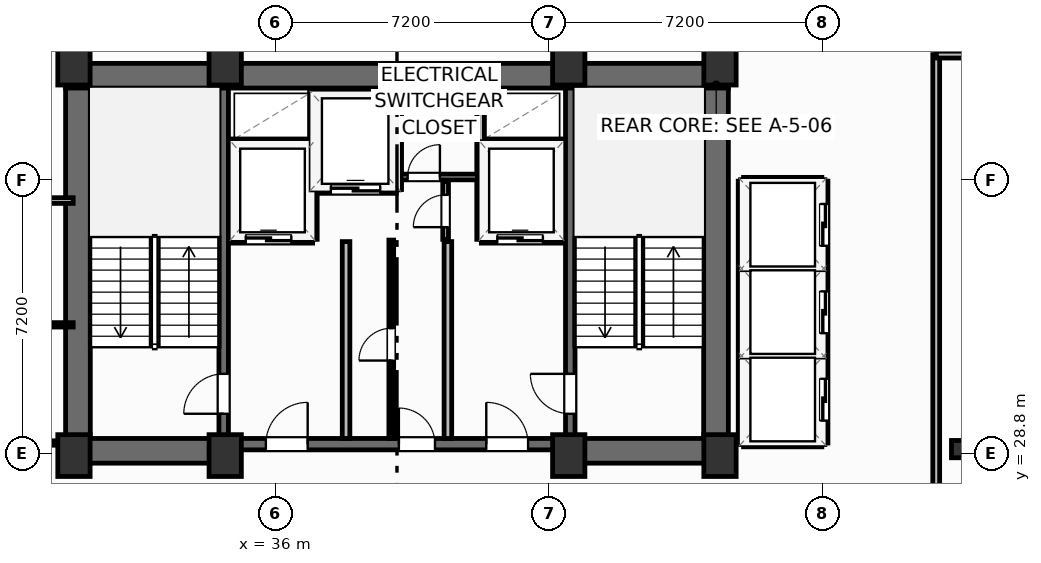
"""IFC4 building model, lengths in metres.
Left out: names, types, materials, properties, quantities, classifications, styles, units other than length and angle.
Written with IfcOpenShell. Run it as: python <this file> out.ifc"""

import sys

from ifc_helpers import new_model, si_unit, direction, frame, frame_2d, origin, origin_2d, place, context, subcontext, project, spatial, rectangle, i_section, extrude, element, fill, save


model = new_model("IFC4")
c1 = context("Model", 3, precision=1e-05, world=origin(), true_north=direction((0.0, 1.0)))
c2 = subcontext(c1, "Body", "Model", "MODEL_VIEW")
j1 = project(units=[si_unit("LENGTHUNIT", "METRE"), si_unit("PLANEANGLEUNIT", "RADIAN")], contexts=[c1])
p1 = place(None, origin())
s1 = spatial("IfcSite", under=j1, at=p1, CompositionType="ELEMENT")
p2 = place(p1, origin())
s2 = spatial("IfcBuilding", under=s1, at=p2, CompositionType="ELEMENT")
p3 = place(p2, frame((0.0, 0.0, 204.2)))
s3 = spatial("IfcBuildingStorey", under=s2, at=p3, CompositionType="ELEMENT", Elevation=204.2)
for number, where, z_axis, x_axis in (
    (1, (30.7, 28.75, 0.0), (0.0, 0.0, 1.0), (1.0, 0.0, 0.0)),
    (2, (34.68, 28.75, 0.0), (0.0, 0.0, 1.0), (1.0, 0.0, 0.0)),
    (3, (43.72, 28.75, 0.0), (0.0, 0.0, 1.0), (1.0, 0.0, 0.0)),
    (4, (47.7, 28.75, 0.0), (0.0, 0.0, 1.0), (1.0, 0.0, 0.0)),
    (5, (30.7, 39.05, 0.0), (0.0, 0.0, 1.0), (1.0, 0.0, 0.0)),
    (6, (34.68, 39.05, 0.0), (0.0, 0.0, 1.0), (1.0, 0.0, 0.0)),
    (7, (43.72, 39.05, 0.0), (0.0, 0.0, 1.0), (1.0, 0.0, 0.0)),
    (8, (47.7, 39.05, 0.0), (0.0, 0.0, 1.0), (1.0, 0.0, 0.0)),
):
    element("IfcColumn", number, at=place(p3, frame(where, z_axis=z_axis, x_axis=x_axis)), inside=s3, PredefinedType="COLUMN", context=c2, shape_type="SweptSolid", body=[
        extrude(rectangle(XDim=0.85, YDim=1.1, at=origin_2d()), origin(), (0.0, 0.0, 1.0), 3.7),
    ])
p4 = place(p3, frame((54.0, 28.92, 0.0), z_axis=(0.0, 0.0, 1.0), x_axis=(1.0, 0.0, 0.0)))
e9 = element("IfcColumn", 9, at=p4, inside=s3, PredefinedType="COLUMN", context=c2, shape_type="SweptSolid", body=[
    extrude(i_section(OverallWidth=0.418, OverallDepth=0.455, WebThickness=0.042, FlangeThickness=0.068, FilletRadius=0.025, at=origin_2d()), origin(), (0.0, 0.0, 1.0), 3.7),
])
p5 = place(p3, frame((30.48, 38.745, 0.0), z_axis=(0.0, 0.0, 1.0), x_axis=(1.0, 0.0, 0.0)))
e10 = element("IfcWall", 10, at=p5, inside=s3, PredefinedType="SHEAR", context=c2, shape_type="SweptSolid", body=[
    extrude(rectangle(XDim=17.44, YDim=0.65, at=frame_2d((8.72, 0.0))), origin(), (0.0, 0.0, 1.0), 3.38),
])
for number, where, z_axis, x_axis in (
    (11, (30.805, 29.2, 0.0), (0.0, 0.0, 1.0), (0.0, 1.0, 0.0)),
    (12, (47.595, 29.2, 0.0), (0.0, 0.0, 1.0), (0.0, 1.0, 0.0)),
):
    element("IfcWall", number, at=place(p3, frame(where, z_axis=z_axis, x_axis=x_axis)), inside=s3, PredefinedType="SHEAR", context=c2, shape_type="SweptSolid", body=[
        extrude(rectangle(XDim=9.22, YDim=0.65, at=frame_2d((4.61, 0.0))), origin(), (0.0, 0.0, 1.0), 3.38),
    ])
p6 = place(p3, frame((30.48, 28.875, 0.0), z_axis=(0.0, 0.0, 1.0), x_axis=(1.0, 0.0, 0.0)))
e13 = element("IfcWall", 13, at=p6, inside=s3, PredefinedType="SHEAR", context=c2, shape_type="SweptSolid", body=[
    extrude(rectangle(XDim=4.32, YDim=0.65, at=frame_2d((2.16, 0.0))), origin(), (0.0, 0.0, 1.0), 3.38),
])
p7 = place(p3, frame((43.6, 28.875, 0.0), z_axis=(0.0, 0.0, 1.0), x_axis=(1.0, 0.0, 0.0)))
e14 = element("IfcWall", 14, at=p7, inside=s3, PredefinedType="SHEAR", context=c2, shape_type="SweptSolid", body=[
    extrude(rectangle(XDim=4.32, YDim=0.65, at=frame_2d((2.16, 0.0))), origin(), (0.0, 0.0, 1.0), 3.38),
])
p8 = place(p3, frame((34.8, 29.05, 0.0), z_axis=(0.0, 0.0, 1.0), x_axis=(1.0, 0.0, 0.0)))
e15 = element("IfcWall", 15, at=p8, inside=s3, PredefinedType="SHEAR", context=c2, shape_type="SweptSolid", body=[
    extrude(rectangle(XDim=8.8, YDim=0.3, at=frame_2d((4.4, 0.0))), origin(), (0.0, 0.0, 1.0), 3.38),
])
p9 = place(p8, frame((0.95, 0.0, 0.0)))
e16 = element("IfcOpeningElement", 16, at=p9, cuts=e15, PredefinedType="OPENING", context=c2, shape_type="SweptSolid", body=[
    extrude(rectangle(XDim=1.1, YDim=2.15, at=frame_2d((0.55, 1.075))), frame((0.0, 0.16, 0.0), z_axis=(0.0, -1.0, 0.0), x_axis=(1.0, 0.0, 0.0)), (0.0, 0.0, 1.0), 0.32),
])
p10 = place(p8, frame((6.75, 0.0, 0.0)))
e17 = element("IfcOpeningElement", 17, at=p10, cuts=e15, PredefinedType="OPENING", context=c2, shape_type="SweptSolid", body=[
    extrude(rectangle(XDim=1.1, YDim=2.15, at=frame_2d((0.55, 1.075))), frame((0.0, 0.16, 0.0), z_axis=(0.0, -1.0, 0.0), x_axis=(1.0, 0.0, 0.0)), (0.0, 0.0, 1.0), 0.32),
])
p11 = place(p8, frame((4.45, 0.0, 0.0)))
e18 = element("IfcOpeningElement", 18, at=p11, cuts=e15, PredefinedType="OPENING", context=c2, shape_type="SweptSolid", body=[
    extrude(rectangle(XDim=0.95, YDim=2.15, at=frame_2d((0.475, 1.075))), frame((0.0, 0.16, 0.0), z_axis=(0.0, -1.0, 0.0), x_axis=(1.0, 0.0, 0.0)), (0.0, 0.0, 1.0), 0.32),
])
p12 = place(p3, frame((34.64, 29.2, 0.0), z_axis=(0.0, 0.0, 1.0), x_axis=(0.0, 1.0, 0.0)))
e19 = element("IfcWall", 19, at=p12, inside=s3, PredefinedType="SHEAR", context=c2, shape_type="SweptSolid", body=[
    extrude(rectangle(XDim=9.22, YDim=0.25, at=frame_2d((4.61, 0.0))), origin(), (0.0, 0.0, 1.0), 3.38),
])
p13 = place(p12, frame((0.65, 0.0, 0.0)))
e20 = element("IfcOpeningElement", 20, at=p13, cuts=e19, PredefinedType="OPENING", context=c2, shape_type="SweptSolid", body=[
    extrude(rectangle(XDim=1.05, YDim=2.15, at=frame_2d((0.525, 1.075))), frame((0.0, 0.135, 0.0), z_axis=(0.0, -1.0, 0.0), x_axis=(1.0, 0.0, 0.0)), (0.0, 0.0, 1.0), 0.27),
])
p14 = place(p3, frame((43.76, 29.2, 0.0), z_axis=(0.0, 0.0, 1.0), x_axis=(0.0, 1.0, 0.0)))
e21 = element("IfcWall", 21, at=p14, inside=s3, PredefinedType="SHEAR", context=c2, shape_type="SweptSolid", body=[
    extrude(rectangle(XDim=9.22, YDim=0.25, at=frame_2d((4.61, 0.0))), origin(), (0.0, 0.0, 1.0), 3.38),
])
p15 = place(p14, frame((0.65, 0.0, 0.0)))
e22 = element("IfcOpeningElement", 22, at=p15, cuts=e21, PredefinedType="OPENING", context=c2, shape_type="SweptSolid", body=[
    extrude(rectangle(XDim=1.05, YDim=2.15, at=frame_2d((0.525, 1.075))), frame((0.0, 0.135, 0.0), z_axis=(0.0, -1.0, 0.0), x_axis=(1.0, 0.0, 0.0)), (0.0, 0.0, 1.0), 0.27),
])
p16 = place(p3, frame((53.45, 39.3, 0.0), z_axis=(0.0, 0.0, 1.0), x_axis=(0.0, 1.0, 0.0)))
e23 = element("IfcWall", 23, at=p16, inside=s3, PredefinedType="PARTITIONING", context=c2, shape_type="SweptSolid", body=[
    extrude(rectangle(XDim=2.31, YDim=0.125, at=frame_2d((1.155, 0.0))), origin(), (0.0, 0.0, 1.0), 3.38),
])
p17 = place(p3, frame((53.39, 19.24, 0.0), z_axis=(0.0, 0.0, 1.0), x_axis=(0.0, 1.0, 0.0)))
e24 = element("IfcWall", 24, at=p17, inside=s3, PredefinedType="PARTITIONING", context=c2, shape_type="SweptSolid", body=[
    extrude(rectangle(XDim=20.06, YDim=0.18, at=frame_2d((10.03, 0.0))), origin(), (0.0, 0.0, 1.0), 3.38),
])
p18 = place(p17, frame((7.7, 0.0, 0.0)))
e25 = element("IfcOpeningElement", 25, at=p18, cuts=e24, PredefinedType="OPENING", context=c2, shape_type="SweptSolid", body=[
    extrude(rectangle(XDim=0.95, YDim=2.05, at=frame_2d((0.475, 1.025))), frame((0.0, 0.1, 0.0), z_axis=(0.0, -1.0, 0.0), x_axis=(1.0, 0.0, 0.0)), (0.0, 0.0, 1.0), 0.2),
])
p19 = place(p3, frame((53.39, 39.3, 0.0), z_axis=(0.0, 0.0, 1.0), x_axis=(1.0, 0.0, 0.0)))
e26 = element("IfcWall", 26, at=p19, inside=s3, PredefinedType="PARTITIONING", context=c2, shape_type="SweptSolid", body=[
    extrude(rectangle(XDim=19.49, YDim=0.18, at=frame_2d((9.745, 0.0))), origin(), (0.0, 0.0, 1.0), 3.38),
])
for number, where, z_axis, x_axis in (
    (27, (37.86, 29.2, 0.0), (0.0, 0.0, 1.0), (0.0, 1.0, 0.0)),
    (28, (40.54, 29.2, 0.0), (0.0, 0.0, 1.0), (0.0, 1.0, 0.0)),
):
    element("IfcWall", number, at=place(p3, frame(where, z_axis=z_axis, x_axis=x_axis)), inside=s3, PredefinedType="PARTITIONING", context=c2, shape_type="SweptSolid", body=[
        extrude(rectangle(XDim=5.18, YDim=0.2, at=frame_2d((2.59, 0.0))), origin(), (0.0, 0.0, 1.0), 3.38),
    ])
p20 = place(p3, frame((34.8, 34.44, 0.0), z_axis=(0.0, 0.0, 1.0), x_axis=(1.0, 0.0, 0.0)))
e29 = element("IfcWall", 29, at=p20, inside=s3, PredefinedType="PARTITIONING", context=c2, shape_type="SweptSolid", body=[
    extrude(rectangle(XDim=2.18, YDim=0.2, at=frame_2d((1.09, 0.0))), origin(), (0.0, 0.0, 1.0), 3.38),
])
p21 = place(p20, frame((0.42, 0.0, 0.0)))
e30 = element("IfcOpeningElement", 30, at=p21, cuts=e29, PredefinedType="OPENING", context=c2, shape_type="SweptSolid", body=[
    extrude(rectangle(XDim=1.2, YDim=2.2, at=frame_2d((0.6, 1.1))), frame((0.0, 0.11, 0.0), z_axis=(0.0, -1.0, 0.0), x_axis=(1.0, 0.0, 0.0)), (0.0, 0.0, 1.0), 0.22),
])
p22 = place(p3, frame((34.8, 36.98, 0.0), z_axis=(0.0, 0.0, 1.0), x_axis=(1.0, 0.0, 0.0)))
e31 = element("IfcWall", 31, at=p22, inside=s3, PredefinedType="PARTITIONING", context=c2, shape_type="SweptSolid", body=[
    extrude(rectangle(XDim=2.18, YDim=0.2, at=frame_2d((1.09, 0.0))), origin(), (0.0, 0.0, 1.0), 3.38),
])
p23 = place(p3, frame((37.0, 34.44, 0.0), z_axis=(0.0, 0.0, 1.0), x_axis=(0.0, 1.0, 0.0)))
e32 = element("IfcWall", 32, at=p23, inside=s3, PredefinedType="PARTITIONING", context=c2, shape_type="SweptSolid", body=[
    extrude(rectangle(XDim=3.9, YDim=0.2, at=frame_2d((1.95, 0.0))), origin(), (0.0, 0.0, 1.0), 3.38),
])
p24 = place(p3, frame((41.42, 34.44, 0.0), z_axis=(0.0, 0.0, 1.0), x_axis=(1.0, 0.0, 0.0)))
e33 = element("IfcWall", 33, at=p24, inside=s3, PredefinedType="PARTITIONING", context=c2, shape_type="SweptSolid", body=[
    extrude(rectangle(XDim=2.18, YDim=0.2, at=frame_2d((1.09, 0.0))), origin(), (0.0, 0.0, 1.0), 3.38),
])
p25 = place(p24, frame((0.42, 0.0, 0.0)))
e34 = element("IfcOpeningElement", 34, at=p25, cuts=e33, PredefinedType="OPENING", context=c2, shape_type="SweptSolid", body=[
    extrude(rectangle(XDim=1.2, YDim=2.2, at=frame_2d((0.6, 1.1))), frame((0.0, 0.11, 0.0), z_axis=(0.0, -1.0, 0.0), x_axis=(1.0, 0.0, 0.0)), (0.0, 0.0, 1.0), 0.22),
])
p26 = place(p3, frame((41.42, 36.98, 0.0), z_axis=(0.0, 0.0, 1.0), x_axis=(1.0, 0.0, 0.0)))
e35 = element("IfcWall", 35, at=p26, inside=s3, PredefinedType="PARTITIONING", context=c2, shape_type="SweptSolid", body=[
    extrude(rectangle(XDim=2.18, YDim=0.2, at=frame_2d((1.09, 0.0))), origin(), (0.0, 0.0, 1.0), 3.38),
])
p27 = place(p3, frame((41.4, 34.44, 0.0), z_axis=(0.0, 0.0, 1.0), x_axis=(0.0, 1.0, 0.0)))
e36 = element("IfcWall", 36, at=p27, inside=s3, PredefinedType="PARTITIONING", context=c2, shape_type="SweptSolid", body=[
    extrude(rectangle(XDim=3.9, YDim=0.2, at=frame_2d((1.95, 0.0))), origin(), (0.0, 0.0, 1.0), 3.38),
])
p28 = place(p3, frame((37.06, 35.75, 0.0), z_axis=(0.0, 0.0, 1.0), x_axis=(1.0, 0.0, 0.0)))
e37 = element("IfcWall", 37, at=p28, inside=s3, PredefinedType="PARTITIONING", context=c2, shape_type="SweptSolid", body=[
    extrude(rectangle(XDim=2.12, YDim=0.2, at=frame_2d((1.06, 0.0))), origin(), (0.0, 0.0, 1.0), 3.38),
])
p29 = place(p28, frame((0.4, 0.0, 0.0)))
e38 = element("IfcOpeningElement", 38, at=p29, cuts=e37, PredefinedType="OPENING", context=c2, shape_type="SweptSolid", body=[
    extrude(rectangle(XDim=1.3, YDim=2.2, at=frame_2d((0.65, 1.1))), frame((0.0, 0.11, 0.0), z_axis=(0.0, -1.0, 0.0), x_axis=(1.0, 0.0, 0.0)), (0.0, 0.0, 1.0), 0.22),
])
p30 = place(p3, frame((39.22, 35.75, 0.0), z_axis=(0.0, 0.0, 1.0), x_axis=(0.0, 1.0, 0.0)))
e39 = element("IfcWall", 39, at=p30, inside=s3, PredefinedType="PARTITIONING", context=c2, shape_type="SweptSolid", body=[
    extrude(rectangle(XDim=2.59, YDim=0.2, at=frame_2d((1.295, 0.0))), origin(), (0.0, 0.0, 1.0), 3.38),
])
p31 = place(p3, frame((39.3, 36.08, 0.0), z_axis=(0.0, 0.0, 1.0), x_axis=(1.0, 0.0, 0.0)))
e40 = element("IfcWall", 40, at=p31, inside=s3, PredefinedType="PARTITIONING", context=c2, shape_type="SweptSolid", body=[
    extrude(rectangle(XDim=2.02, YDim=0.15, at=frame_2d((1.01, 0.0))), origin(), (0.0, 0.0, 1.0), 3.38),
])
p32 = place(p31, frame((0.18, 0.0, 0.0)))
e41 = element("IfcOpeningElement", 41, at=p32, cuts=e40, PredefinedType="OPENING", context=c2, shape_type="SweptSolid", body=[
    extrude(rectangle(XDim=0.85, YDim=2.05, at=frame_2d((0.425, 1.025))), frame((0.0, 0.085, 0.0), z_axis=(0.0, -1.0, 0.0), x_axis=(1.0, 0.0, 0.0)), (0.0, 0.0, 1.0), 0.17),
])
p33 = place(p3, frame((40.48, 34.44, 0.0), z_axis=(0.0, 0.0, 1.0), x_axis=(0.0, 1.0, 0.0)))
e42 = element("IfcWall", 42, at=p33, inside=s3, PredefinedType="PARTITIONING", context=c2, shape_type="SweptSolid", body=[
    extrude(rectangle(XDim=1.52, YDim=0.15, at=frame_2d((0.76, 0.0))), origin(), (0.0, 0.0, 1.0), 3.38),
])
p34 = place(p33, frame((0.32, 0.0, 0.0)))
e43 = element("IfcOpeningElement", 43, at=p34, cuts=e42, PredefinedType="OPENING", context=c2, shape_type="SweptSolid", body=[
    extrude(rectangle(XDim=0.85, YDim=2.05, at=frame_2d((0.425, 1.025))), frame((0.0, 0.085, 0.0), z_axis=(0.0, -1.0, 0.0), x_axis=(1.0, 0.0, 0.0)), (0.0, 0.0, 1.0), 0.17),
])
p35 = place(p3, frame((39.05, 29.2, 0.0), z_axis=(0.0, 0.0, 1.0), x_axis=(0.0, 1.0, 0.0)))
e44 = element("IfcWall", 44, at=p35, inside=s3, PredefinedType="PARTITIONING", context=c2, shape_type="SweptSolid", body=[
    extrude(rectangle(XDim=5.22, YDim=0.125, at=frame_2d((2.61, 0.0))), origin(), (0.0, 0.0, 1.0), 3.38),
])
p36 = place(p35, frame((2.05, 0.0, 0.0)))
e45 = element("IfcOpeningElement", 45, at=p36, cuts=e44, PredefinedType="OPENING", context=c2, shape_type="SweptSolid", body=[
    extrude(rectangle(XDim=0.85, YDim=2.05, at=frame_2d((0.425, 1.025))), frame((0.0, 0.073, 0.0), z_axis=(0.0, -1.0, 0.0), x_axis=(1.0, 0.0, 0.0)), (0.0, 0.0, 1.0), 0.145),
])
p37 = place(p3, frame((26.8, 32.19, 0.0), z_axis=(0.0, 0.0, 1.0), x_axis=(1.0, 0.0, 0.0)))
e46 = element("IfcWall", 46, at=p37, inside=s3, PredefinedType="PARTITIONING", context=c2, shape_type="SweptSolid", body=[
    extrude(rectangle(XDim=3.88, YDim=0.115, at=frame_2d((1.94, 0.0))), origin(), (0.0, 0.0, 1.0), 3.38),
])
p38 = place(p3, frame((26.78, 29.08, 0.0), z_axis=(0.0, 0.0, 1.0), x_axis=(1.0, 0.0, 0.0)))
e47 = element("IfcWall", 47, at=p38, inside=s3, PredefinedType="PARTITIONING", context=c2, shape_type="SweptSolid", body=[
    extrude(rectangle(XDim=3.7, YDim=0.115, at=frame_2d((1.85, 0.0))), origin(), (0.0, 0.0, 1.0), 3.38),
])
p39 = place(p3, frame((26.78, 35.46, 0.0), z_axis=(0.0, 0.0, 1.0), x_axis=(1.0, 0.0, 0.0)))
e48 = element("IfcWall", 48, at=p39, inside=s3, PredefinedType="PARTITIONING", context=c2, shape_type="SweptSolid", body=[
    extrude(rectangle(XDim=3.9, YDim=0.15, at=frame_2d((1.95, 0.0))), origin(), (0.0, 0.0, 1.0), 3.38),
])
for number, where, z_axis, x_axis in (
    (49, (48.32, 31.375, 0.0), (0.0, 0.0, 1.0), (1.0, 0.0, 0.0)),
    (50, (48.32, 33.675, 0.0), (0.0, 0.0, 1.0), (1.0, 0.0, 0.0)),
):
    element("IfcWall", number, at=place(p3, frame(where, z_axis=z_axis, x_axis=x_axis)), inside=s3, PredefinedType="PARTITIONING", context=c2, shape_type="SweptSolid", body=[
        extrude(rectangle(XDim=2.06, YDim=0.2, at=frame_2d((1.03, 0.0))), origin(), (0.0, 0.0, 1.0), 3.38),
    ])
p40 = place(p3, frame((48.32, 29.08, 0.0), z_axis=(0.0, 0.0, 1.0), x_axis=(1.0, 0.0, 0.0)))
e51 = element("IfcWall", 51, at=p40, inside=s3, PredefinedType="PARTITIONING", context=c2, shape_type="SweptSolid", body=[
    extrude(rectangle(XDim=2.06, YDim=0.2, at=frame_2d((1.03, 0.0))), origin(), (0.0, 0.0, 1.0), 2.592),
])
p41 = place(p3, frame((48.32, 35.97, 0.0), z_axis=(0.0, 0.0, 1.0), x_axis=(1.0, 0.0, 0.0)))
e52 = element("IfcWall", 52, at=p41, inside=s3, PredefinedType="PARTITIONING", context=c2, shape_type="SweptSolid", body=[
    extrude(rectangle(XDim=2.06, YDim=0.2, at=frame_2d((1.03, 0.0))), origin(), (0.0, 0.0, 1.0), 3.38),
])
p42 = place(p3, frame((48.28, 29.08, 0.0), z_axis=(0.0, 0.0, 1.0), x_axis=(0.0, 1.0, 0.0)))
e53 = element("IfcWall", 53, at=p42, inside=s3, PredefinedType="PARTITIONING", context=c2, shape_type="SweptSolid", body=[
    extrude(rectangle(XDim=6.89, YDim=0.2, at=frame_2d((3.445, 0.0))), origin(), (0.0, 0.0, 1.0), 3.38),
])
p43 = place(p3, frame((50.44, 29.08, 0.0), z_axis=(0.0, 0.0, 1.0), x_axis=(0.0, 1.0, 0.0)))
e54 = element("IfcWall", 54, at=p43, inside=s3, PredefinedType="PARTITIONING", context=c2, shape_type="SweptSolid", body=[
    extrude(rectangle(XDim=6.89, YDim=0.2, at=frame_2d((3.445, 0.0))), origin(), (0.0, 0.0, 1.0), 3.38),
])
p44 = place(p43, frame((0.59, 0.0, 0.0)))
e55 = element("IfcOpeningElement", 55, at=p44, cuts=e54, PredefinedType="OPENING", context=c2, shape_type="SweptSolid", body=[
    extrude(rectangle(XDim=1.1, YDim=2.15, at=frame_2d((0.55, 1.075))), frame((0.0, 0.11, 0.0), z_axis=(0.0, -1.0, 0.0), x_axis=(1.0, 0.0, 0.0)), (0.0, 0.0, 1.0), 0.22),
])
p45 = place(p43, frame((2.89, 0.0, 0.0)))
e56 = element("IfcOpeningElement", 56, at=p45, cuts=e54, PredefinedType="OPENING", context=c2, shape_type="SweptSolid", body=[
    extrude(rectangle(XDim=1.1, YDim=2.15, at=frame_2d((0.55, 1.075))), frame((0.0, 0.11, 0.0), z_axis=(0.0, -1.0, 0.0), x_axis=(1.0, 0.0, 0.0)), (0.0, 0.0, 1.0), 0.22),
])
p46 = place(p43, frame((5.19, 0.0, 0.0)))
e57 = element("IfcOpeningElement", 57, at=p46, cuts=e54, PredefinedType="OPENING", context=c2, shape_type="SweptSolid", body=[
    extrude(rectangle(XDim=1.1, YDim=2.15, at=frame_2d((0.55, 1.075))), frame((0.0, 0.11, 0.0), z_axis=(0.0, -1.0, 0.0), x_axis=(1.0, 0.0, 0.0)), (0.0, 0.0, 1.0), 0.22),
])
p47 = place(p13, origin())
e58 = element("IfcDoor", 58, at=p47, inside=s3, OperationType="SINGLE_SWING_LEFT", PredefinedType="DOOR", context=c2, shape_type="SweptSolid", body=[
    extrude(rectangle(XDim=1.05, YDim=2.15, at=frame_2d((0.525, 1.075))), frame((0.0, 0.025, 0.0), z_axis=(0.0, -1.0, 0.0), x_axis=(1.0, 0.0, 0.0)), (0.0, 0.0, 1.0), 0.05),
])
fill(e20, e58)
p48 = place(p15, origin())
e59 = element("IfcDoor", 59, at=p48, inside=s3, OperationType="SINGLE_SWING_RIGHT", PredefinedType="DOOR", context=c2, shape_type="SweptSolid", body=[
    extrude(rectangle(XDim=1.05, YDim=2.15, at=frame_2d((0.525, 1.075))), frame((0.0, 0.025, 0.0), z_axis=(0.0, -1.0, 0.0), x_axis=(1.0, 0.0, 0.0)), (0.0, 0.0, 1.0), 0.05),
])
fill(e22, e59)
p49 = place(p9, origin())
e60 = element("IfcDoor", 60, at=p49, inside=s3, OperationType="SINGLE_SWING_RIGHT", PredefinedType="DOOR", context=c2, shape_type="SweptSolid", body=[
    extrude(rectangle(XDim=1.1, YDim=2.15, at=frame_2d((0.55, 1.075))), frame((0.0, 0.025, 0.0), z_axis=(0.0, -1.0, 0.0), x_axis=(1.0, 0.0, 0.0)), (0.0, 0.0, 1.0), 0.05),
])
fill(e16, e60)
p50 = place(p10, origin())
e61 = element("IfcDoor", 61, at=p50, inside=s3, OperationType="SINGLE_SWING_LEFT", PredefinedType="DOOR", context=c2, shape_type="SweptSolid", body=[
    extrude(rectangle(XDim=1.1, YDim=2.15, at=frame_2d((0.55, 1.075))), frame((0.0, 0.025, 0.0), z_axis=(0.0, -1.0, 0.0), x_axis=(1.0, 0.0, 0.0)), (0.0, 0.0, 1.0), 0.05),
])
fill(e17, e61)
p51 = place(p21, origin())
e62 = element("IfcDoor", 62, at=p51, inside=s3, OperationType="SLIDING_TO_LEFT", PredefinedType="DOOR", context=c2, shape_type="SweptSolid", body=[
    extrude(rectangle(XDim=1.2, YDim=2.2, at=frame_2d((0.6, 1.1))), frame((0.0, 0.025, 0.0), z_axis=(0.0, -1.0, 0.0), x_axis=(1.0, 0.0, 0.0)), (0.0, 0.0, 1.0), 0.05),
])
fill(e30, e62)
p52 = place(p25, origin())
e63 = element("IfcDoor", 63, at=p52, inside=s3, OperationType="SLIDING_TO_LEFT", PredefinedType="DOOR", context=c2, shape_type="SweptSolid", body=[
    extrude(rectangle(XDim=1.2, YDim=2.2, at=frame_2d((0.6, 1.1))), frame((0.0, 0.025, 0.0), z_axis=(0.0, -1.0, 0.0), x_axis=(1.0, 0.0, 0.0)), (0.0, 0.0, 1.0), 0.05),
])
fill(e34, e63)
p53 = place(p29, origin())
e64 = element("IfcDoor", 64, at=p53, inside=s3, OperationType="SLIDING_TO_LEFT", PredefinedType="DOOR", context=c2, shape_type="SweptSolid", body=[
    extrude(rectangle(XDim=1.3, YDim=2.2, at=frame_2d((0.65, 1.1))), frame((0.0, 0.025, 0.0), z_axis=(0.0, -1.0, 0.0), x_axis=(1.0, 0.0, 0.0)), (0.0, 0.0, 1.0), 0.05),
])
fill(e38, e64)
p54 = place(p32, origin())
e65 = element("IfcDoor", 65, at=p54, inside=s3, OperationType="SINGLE_SWING_RIGHT", PredefinedType="DOOR", context=c2, shape_type="SweptSolid", body=[
    extrude(rectangle(XDim=0.85, YDim=2.05, at=frame_2d((0.425, 1.025))), frame((0.0, 0.025, 0.0), z_axis=(0.0, -1.0, 0.0), x_axis=(1.0, 0.0, 0.0)), (0.0, 0.0, 1.0), 0.05),
])
fill(e41, e65)
p55 = place(p34, origin())
e66 = element("IfcDoor", 66, at=p55, inside=s3, OperationType="SINGLE_SWING_LEFT", PredefinedType="DOOR", context=c2, shape_type="SweptSolid", body=[
    extrude(rectangle(XDim=0.85, YDim=2.05, at=frame_2d((0.425, 1.025))), frame((0.0, 0.025, 0.0), z_axis=(0.0, -1.0, 0.0), x_axis=(1.0, 0.0, 0.0)), (0.0, 0.0, 1.0), 0.05),
])
fill(e43, e66)
p56 = place(p36, origin())
e67 = element("IfcDoor", 67, at=p56, inside=s3, OperationType="SINGLE_SWING_LEFT", PredefinedType="DOOR", context=c2, shape_type="SweptSolid", body=[
    extrude(rectangle(XDim=0.85, YDim=2.05, at=frame_2d((0.425, 1.025))), frame((0.0, 0.025, 0.0), z_axis=(0.0, -1.0, 0.0), x_axis=(1.0, 0.0, 0.0)), (0.0, 0.0, 1.0), 0.05),
])
fill(e45, e67)
p57 = place(p11, origin())
e68 = element("IfcDoor", 68, at=p57, inside=s3, OperationType="SINGLE_SWING_LEFT", PredefinedType="DOOR", context=c2, shape_type="SweptSolid", body=[
    extrude(rectangle(XDim=0.95, YDim=2.15, at=frame_2d((0.475, 1.075))), frame((0.0, 0.025, 0.0), z_axis=(0.0, -1.0, 0.0), x_axis=(1.0, 0.0, 0.0)), (0.0, 0.0, 1.0), 0.05),
])
fill(e18, e68)
p58 = place(p44, origin())
e69 = element("IfcDoor", 69, at=p58, inside=s3, OperationType="SLIDING_TO_LEFT", PredefinedType="DOOR", context=c2, shape_type="SweptSolid", body=[
    extrude(rectangle(XDim=1.1, YDim=2.15, at=frame_2d((0.55, 1.075))), frame((0.0, 0.025, 0.0), z_axis=(0.0, -1.0, 0.0), x_axis=(1.0, 0.0, 0.0)), (0.0, 0.0, 1.0), 0.05),
])
fill(e55, e69)
p59 = place(p45, origin())
e70 = element("IfcDoor", 70, at=p59, inside=s3, OperationType="SLIDING_TO_LEFT", PredefinedType="DOOR", context=c2, shape_type="SweptSolid", body=[
    extrude(rectangle(XDim=1.1, YDim=2.15, at=frame_2d((0.55, 1.075))), frame((0.0, 0.025, 0.0), z_axis=(0.0, -1.0, 0.0), x_axis=(1.0, 0.0, 0.0)), (0.0, 0.0, 1.0), 0.05),
])
fill(e56, e70)
p60 = place(p46, origin())
e71 = element("IfcDoor", 71, at=p60, inside=s3, OperationType="SLIDING_TO_LEFT", PredefinedType="DOOR", context=c2, shape_type="SweptSolid", body=[
    extrude(rectangle(XDim=1.1, YDim=2.15, at=frame_2d((0.55, 1.075))), frame((0.0, 0.025, 0.0), z_axis=(0.0, -1.0, 0.0), x_axis=(1.0, 0.0, 0.0)), (0.0, 0.0, 1.0), 0.05),
])
fill(e57, e71)
save(model, sys.argv[1])
